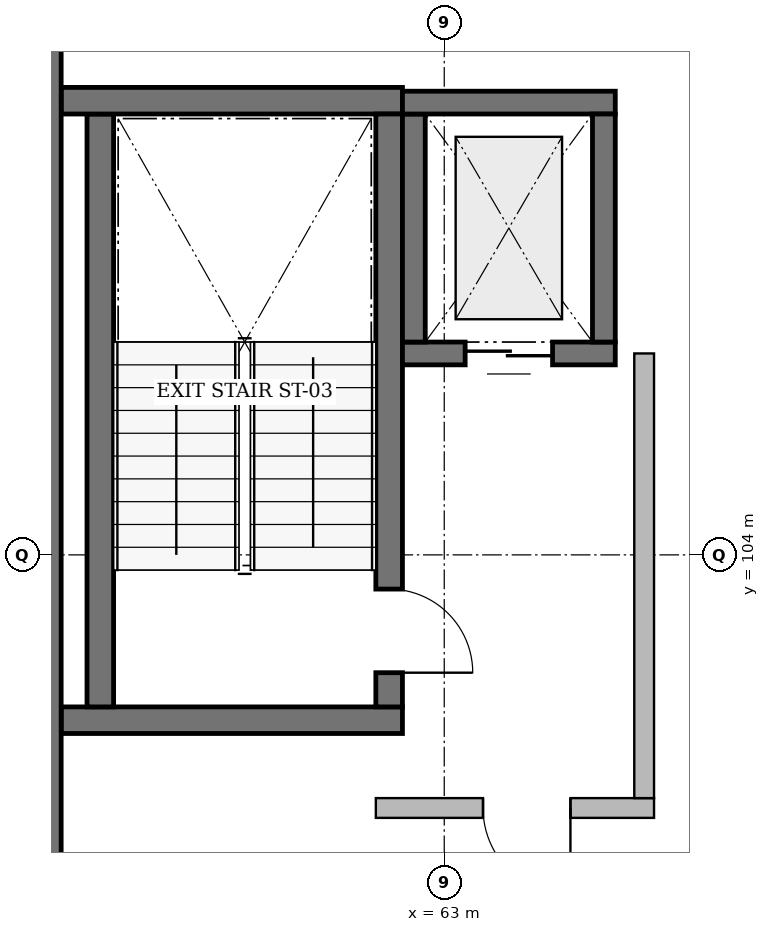
"""IFC4 building model, lengths in metres.
Left out: names, types, materials, properties, quantities, classifications, styles, units other than length and angle.
Written with IfcOpenShell. Run it as: python <this file> out.ifc"""

import sys

from ifc_helpers import new_model, si_unit, direction, frame, frame_2d, origin, place, context, subcontext, project, spatial, rectangle, extrude, element, fill, save


model = new_model("IFC4")
c1 = context("Model", 3, precision=1e-05, world=origin(), true_north=direction((0.0, 1.0)))
c2 = subcontext(c1, "Body", "Model", "MODEL_VIEW")
j1 = project(units=[si_unit("LENGTHUNIT", "METRE"), si_unit("PLANEANGLEUNIT", "RADIAN")], contexts=[c1])
p1 = place(None, origin())
s1 = spatial("IfcSite", under=j1, at=p1, CompositionType="ELEMENT")
p2 = place(p1, origin())
s2 = spatial("IfcBuilding", under=s1, at=p2, CompositionType="ELEMENT")
p3 = place(p2, frame((0.0, 0.0, 13.2)))
s3 = spatial("IfcBuildingStorey", under=s2, at=p3, CompositionType="ELEMENT", Elevation=13.2)
p4 = place(p3, frame((62.45, 101.825, 0.0), z_axis=(0.0, 0.0, 1.0), x_axis=(-1.0, 0.0, 0.0)))
e1 = element("IfcWall", 1, at=p4, inside=s3, PredefinedType="SOLIDWALL", context=c2, shape_type="SweptSolid", body=[
    extrude(rectangle(XDim=4.49, YDim=0.35, at=frame_2d((2.245, 0.0))), origin(), (0.0, 0.0, 1.0), 3.9),
])
p5 = place(p3, frame((58.475, 102.0, 0.0), z_axis=(0.0, 0.0, 1.0), x_axis=(0.0, 1.0, 0.0)))
e2 = element("IfcWall", 2, at=p5, inside=s3, PredefinedType="SOLIDWALL", context=c2, shape_type="SweptSolid", body=[
    extrude(rectangle(XDim=7.8, YDim=0.35, at=frame_2d((3.9, 0.0))), origin(), (0.0, 0.0, 1.0), 3.9),
])
p6 = place(p3, frame((57.96, 109.975, 0.0), z_axis=(0.0, 0.0, 1.0), x_axis=(1.0, 0.0, 0.0)))
e3 = element("IfcWall", 3, at=p6, inside=s3, PredefinedType="SOLIDWALL", context=c2, shape_type="SweptSolid", body=[
    extrude(rectangle(XDim=4.49, YDim=0.35, at=frame_2d((2.245, 0.0))), origin(), (0.0, 0.0, 1.0), 3.9),
])
p7 = place(p3, frame((62.275, 109.8, 0.0), z_axis=(0.0, 0.0, 1.0), x_axis=(0.0, -1.0, 0.0)))
e4 = element("IfcWall", 4, at=p7, inside=s3, PredefinedType="SOLIDWALL", context=c2, shape_type="SweptSolid", body=[
    extrude(rectangle(XDim=7.8, YDim=0.35, at=frame_2d((3.9, 0.0))), origin(), (0.0, 0.0, 1.0), 3.9),
])
p8 = place(p7, frame((6.25, 0.0, 0.0)))
e5 = element("IfcOpeningElement", 5, at=p8, cuts=e4, PredefinedType="OPENING", context=c2, shape_type="SweptSolid", body=[
    extrude(rectangle(XDim=1.1, YDim=2.15, at=frame_2d((0.55, 1.075))), frame((0.0, 0.195, 0.0), z_axis=(0.0, -1.0, 0.0), x_axis=(1.0, 0.0, 0.0)), (0.0, 0.0, 1.0), 0.39),
])
p9 = place(p3, frame((65.25, 106.65, 0.0), z_axis=(0.0, 0.0, 1.0), x_axis=(-1.0, 0.0, 0.0)))
e6 = element("IfcWall", 6, at=p9, inside=s3, PredefinedType="SOLIDWALL", context=c2, shape_type="SweptSolid", body=[
    extrude(rectangle(XDim=2.8, YDim=0.3, at=frame_2d((1.4, 0.0))), origin(), (0.0, 0.0, 1.0), 3.9),
])
p10 = place(p9, frame((0.825, 0.0, 0.0)))
e7 = element("IfcOpeningElement", 7, at=p10, cuts=e6, PredefinedType="OPENING", context=c2, shape_type="SweptSolid", body=[
    extrude(rectangle(XDim=1.15, YDim=2.1, at=frame_2d((0.575, 1.05))), frame((0.0, 0.17, 0.0), z_axis=(0.0, -1.0, 0.0), x_axis=(1.0, 0.0, 0.0)), (0.0, 0.0, 1.0), 0.34),
])
p11 = place(p3, frame((62.6, 106.8, 0.0), z_axis=(0.0, 0.0, 1.0), x_axis=(0.0, 1.0, 0.0)))
e8 = element("IfcWall", 8, at=p11, inside=s3, PredefinedType="SOLIDWALL", context=c2, shape_type="SweptSolid", body=[
    extrude(rectangle(XDim=3.0, YDim=0.3, at=frame_2d((1.5, 0.0))), origin(), (0.0, 0.0, 1.0), 3.9),
])
p12 = place(p3, frame((62.45, 109.95, 0.0), z_axis=(0.0, 0.0, 1.0), x_axis=(1.0, 0.0, 0.0)))
e9 = element("IfcWall", 9, at=p12, inside=s3, PredefinedType="SOLIDWALL", context=c2, shape_type="SweptSolid", body=[
    extrude(rectangle(XDim=2.8, YDim=0.3, at=frame_2d((1.4, 0.0))), origin(), (0.0, 0.0, 1.0), 3.9),
])
p13 = place(p3, frame((65.1, 109.8, 0.0), z_axis=(0.0, 0.0, 1.0), x_axis=(0.0, -1.0, 0.0)))
e10 = element("IfcWall", 10, at=p13, inside=s3, PredefinedType="SOLIDWALL", context=c2, shape_type="SweptSolid", body=[
    extrude(rectangle(XDim=3.0, YDim=0.3, at=frame_2d((1.5, 0.0))), origin(), (0.0, 0.0, 1.0), 3.9),
])
p14 = place(p3, frame((65.76, 100.67, 0.0), z_axis=(0.0, 0.0, 1.0), x_axis=(-1.0, 0.0, 0.0)))
e11 = element("IfcWall", 11, at=p14, inside=s3, PredefinedType="SOLIDWALL", context=c2, shape_type="SweptSolid", body=[
    extrude(rectangle(XDim=3.66, YDim=0.26, at=frame_2d((1.83, 0.0))), origin(), (0.0, 0.0, 1.0), 3.65),
])
p15 = place(p14, frame((1.1, 0.0, 0.0)))
e12 = element("IfcOpeningElement", 12, at=p15, cuts=e11, PredefinedType="OPENING", context=c2, shape_type="SweptSolid", body=[
    extrude(rectangle(XDim=1.15, YDim=2.2, at=frame_2d((0.575, 1.1))), frame((0.0, 0.15, 0.0), z_axis=(0.0, -1.0, 0.0), x_axis=(1.0, 0.0, 0.0)), (0.0, 0.0, 1.0), 0.3),
])
p16 = place(p3, frame((65.63, 106.65, 0.0), z_axis=(0.0, 0.0, 1.0), x_axis=(0.0, -1.0, 0.0)))
e13 = element("IfcWall", 13, at=p16, inside=s3, PredefinedType="SOLIDWALL", context=c2, shape_type="SweptSolid", body=[
    extrude(rectangle(XDim=5.85, YDim=0.26, at=frame_2d((2.925, 0.0))), origin(), (0.0, 0.0, 1.0), 3.65),
])
p17 = place(p3, frame((57.78, 87.8, 0.0), z_axis=(0.0, 0.0, 1.0), x_axis=(0.0, 1.0, 0.0)))
e14 = element("IfcWall", 14, at=p17, inside=s3, PredefinedType="SOLIDWALL", context=c2, shape_type="SweptSolid", body=[
    extrude(rectangle(XDim=24.0, YDim=0.36, at=frame_2d((12.0, 0.0))), origin(), (0.0, 0.0, 1.0), 3.65),
])
p18 = place(p8, origin())
e15 = element("IfcDoor", 15, at=p18, inside=s3, OperationType="SINGLE_SWING_RIGHT", PredefinedType="DOOR", context=c2, shape_type="SweptSolid", body=[
    extrude(rectangle(XDim=1.1, YDim=2.15, at=frame_2d((0.55, 1.075))), frame((0.0, 0.025, 0.0), z_axis=(0.0, -1.0, 0.0), x_axis=(1.0, 0.0, 0.0)), (0.0, 0.0, 1.0), 0.05),
])
fill(e5, e15)
p19 = place(p10, origin())
e16 = element("IfcDoor", 16, at=p19, inside=s3, OperationType="DOUBLE_DOOR_SLIDING", PredefinedType="DOOR", context=c2, shape_type="SweptSolid", body=[
    extrude(rectangle(XDim=1.15, YDim=2.1, at=frame_2d((0.575, 1.05))), frame((0.0, 0.025, 0.0), z_axis=(0.0, -1.0, 0.0), x_axis=(1.0, 0.0, 0.0)), (0.0, 0.0, 1.0), 0.05),
])
fill(e7, e16)
p20 = place(p15, origin())
e17 = element("IfcDoor", 17, at=p20, inside=s3, OperationType="SINGLE_SWING_LEFT", PredefinedType="DOOR", context=c2, shape_type="SweptSolid", body=[
    extrude(rectangle(XDim=1.15, YDim=2.2, at=frame_2d((0.575, 1.1))), frame((0.0, 0.025, 0.0), z_axis=(0.0, -1.0, 0.0), x_axis=(1.0, 0.0, 0.0)), (0.0, 0.0, 1.0), 0.05),
])
fill(e12, e17)
save(model, sys.argv[1])
